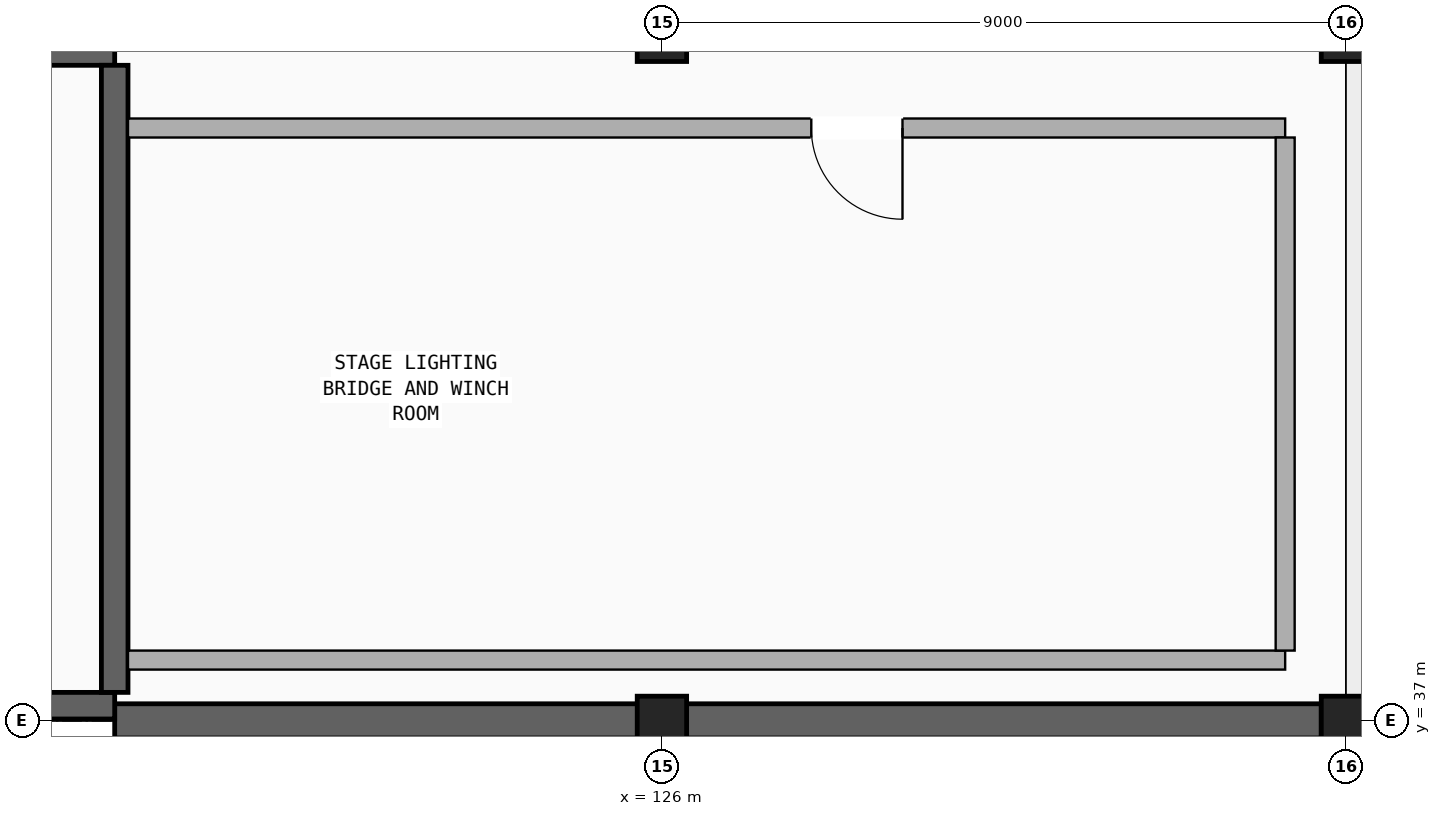
"""IFC4 building model, lengths in metres.
Left out: names, types, materials, properties, quantities, classifications, styles, units other than length and angle.
Written with IfcOpenShell. Run it as: python <this file> out.ifc"""

import sys

from ifc_helpers import new_model, si_unit, direction, frame, frame_2d, origin, origin_2d, place, context, subcontext, project, spatial, rectangle, extrude, element, fill, save


model = new_model("IFC4")
c1 = context("Model", 3, precision=1e-05, world=origin(), true_north=direction((0.0, 1.0)))
c2 = subcontext(c1, "Body", "Model", "MODEL_VIEW")
j1 = project(units=[si_unit("LENGTHUNIT", "METRE"), si_unit("PLANEANGLEUNIT", "RADIAN")], contexts=[c1])
p1 = place(None, origin())
s1 = spatial("IfcSite", under=j1, at=p1, CompositionType="ELEMENT")
p2 = place(p1, origin())
s2 = spatial("IfcBuilding", under=s1, at=p2, CompositionType="ELEMENT")
p3 = place(p2, frame((0.0, 0.0, 17.68)))
s3 = spatial("IfcBuildingStorey", under=s2, at=p3, CompositionType="ELEMENT", Elevation=17.68)
for number, where, z_axis, x_axis in (
    (1, (126.0, 37.0, 0.0), (0.0, 0.0, 1.0), (1.0, 0.0, 0.0)),
    (2, (126.0, 46.0, 0.0), (0.0, 0.0, 1.0), (1.0, 0.0, 0.0)),
    (3, (135.0, 37.0, 0.0), (0.0, 0.0, 1.0), (1.0, 0.0, 0.0)),
    (4, (135.0, 46.0, 0.0), (0.0, 0.0, 1.0), (1.0, 0.0, 0.0)),
):
    element("IfcColumn", number, at=place(p3, frame(where, z_axis=z_axis, x_axis=x_axis)), inside=s3, PredefinedType="COLUMN", context=c2, shape_type="SweptSolid", body=[
        extrude(rectangle(XDim=0.65, YDim=0.65, at=origin_2d()), origin(), (0.0, 0.0, 1.0), 4.08),
    ])
p4 = place(p3, frame((118.8, 37.0, 0.0), z_axis=(0.0, 0.0, 1.0), x_axis=(1.0, 0.0, 0.0)))
e5 = element("IfcWall", 5, at=p4, inside=s3, PredefinedType="SHEAR", context=c2, shape_type="SweptSolid", body=[
    extrude(rectangle(XDim=15.875, YDim=0.45, at=frame_2d((7.938, 0.0))), origin(), (0.0, 0.0, 1.0), 4.08),
])
p5 = place(p3, frame((108.5, 37.2, 0.0), z_axis=(0.0, 0.0, 1.0), x_axis=(1.0, 0.0, 0.0)))
e6 = element("IfcWall", 6, at=p5, inside=s3, PredefinedType="SHEAR", context=c2, shape_type="SweptSolid", body=[
    extrude(rectangle(XDim=10.3, YDim=0.35, at=frame_2d((5.15, 0.0))), origin(), (0.0, 0.0, 1.0), 4.08),
])
p6 = place(p3, frame((108.5, 45.8, 0.0), z_axis=(0.0, 0.0, 1.0), x_axis=(1.0, 0.0, 0.0)))
e7 = element("IfcWall", 7, at=p6, inside=s3, PredefinedType="SHEAR", context=c2, shape_type="SweptSolid", body=[
    extrude(rectangle(XDim=10.3, YDim=0.35, at=frame_2d((5.15, 0.0))), origin(), (0.0, 0.0, 1.0), 4.08),
])
p7 = place(p6, frame((0.45, 0.0, 0.0)))
e8 = element("IfcOpeningElement", 8, at=p7, cuts=e7, PredefinedType="OPENING", context=c2, shape_type="SweptSolid", body=[
    extrude(rectangle(XDim=1.1, YDim=2.2, at=frame_2d((0.55, 1.1))), frame((0.0, 0.185, 0.0), z_axis=(0.0, -1.0, 0.0), x_axis=(1.0, 0.0, 0.0)), (0.0, 0.0, 1.0), 0.37),
])
p8 = place(p6, frame((4.475, 0.0, 0.0)))
e9 = element("IfcOpeningElement", 9, at=p8, cuts=e7, PredefinedType="OPENING", context=c2, shape_type="SweptSolid", body=[
    extrude(rectangle(XDim=1.65, YDim=2.34, at=frame_2d((0.825, 1.17))), frame((0.0, 0.185, 0.0), z_axis=(0.0, -1.0, 0.0), x_axis=(1.0, 0.0, 0.0)), (0.0, 0.0, 1.0), 0.37),
])
p9 = place(p3, frame((118.8, 37.375, 0.0), z_axis=(0.0, 0.0, 1.0), x_axis=(0.0, 1.0, 0.0)))
e10 = element("IfcWall", 10, at=p9, inside=s3, PredefinedType="SHEAR", context=c2, shape_type="SweptSolid", body=[
    extrude(rectangle(XDim=8.25, YDim=0.35, at=frame_2d((4.125, 0.0))), origin(), (0.0, 0.0, 1.0), 4.08),
])
p10 = place(p3, frame((118.975, 37.8, 0.0), z_axis=(0.0, 0.0, 1.0), x_axis=(1.0, 0.0, 0.0)))
e11 = element("IfcWall", 11, at=p10, inside=s3, PredefinedType="PARTITIONING", context=c2, shape_type="SweptSolid", body=[
    extrude(rectangle(XDim=15.225, YDim=0.25, at=frame_2d((7.612, 0.0))), origin(), (0.0, 0.0, 1.0), 3.17),
])
p11 = place(p3, frame((118.975, 44.8, 0.0), z_axis=(0.0, 0.0, 1.0), x_axis=(1.0, 0.0, 0.0)))
e12 = element("IfcWall", 12, at=p11, inside=s3, PredefinedType="PARTITIONING", context=c2, shape_type="SweptSolid", body=[
    extrude(rectangle(XDim=15.225, YDim=0.25, at=frame_2d((7.612, 0.0))), origin(), (0.0, 0.0, 1.0), 3.17),
])
p12 = place(p11, frame((8.99, 0.0, 0.0)))
e13 = element("IfcOpeningElement", 13, at=p12, cuts=e12, PredefinedType="OPENING", context=c2, shape_type="SweptSolid", body=[
    extrude(rectangle(XDim=1.2, YDim=2.2, at=frame_2d((0.6, 1.1))), frame((0.0, 0.135, 0.0), z_axis=(0.0, -1.0, 0.0), x_axis=(1.0, 0.0, 0.0)), (0.0, 0.0, 1.0), 0.27),
])
p13 = place(p3, frame((134.2, 37.925, 0.0), z_axis=(0.0, 0.0, 1.0), x_axis=(0.0, 1.0, 0.0)))
e14 = element("IfcWall", 14, at=p13, inside=s3, PredefinedType="PARTITIONING", context=c2, shape_type="SweptSolid", body=[
    extrude(rectangle(XDim=6.75, YDim=0.25, at=frame_2d((3.375, 0.0))), origin(), (0.0, 0.0, 1.0), 3.36),
])
p14 = place(p12, frame((1.2, 0.0, 0.0), z_axis=(0.0, 0.0, 1.0), x_axis=(-1.0, 0.0, 0.0)))
e15 = element("IfcDoor", 15, at=p14, inside=s3, OperationType="SINGLE_SWING_LEFT", PredefinedType="DOOR", context=c2, shape_type="SweptSolid", body=[
    extrude(rectangle(XDim=1.2, YDim=2.2, at=frame_2d((0.6, 1.1))), frame((0.0, 0.025, 0.0), z_axis=(0.0, -1.0, 0.0), x_axis=(1.0, 0.0, 0.0)), (0.0, 0.0, 1.0), 0.05),
])
fill(e13, e15)
save(model, sys.argv[1])
